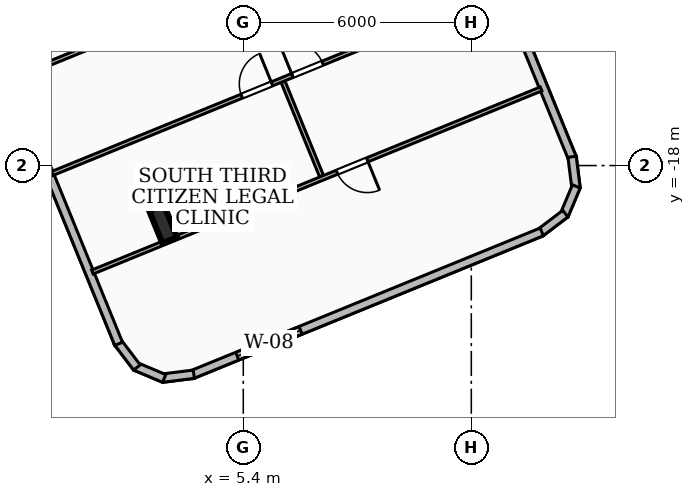
"""IFC4 building model, lengths in metres.
Left out: names, types, materials, properties, quantities, classifications, styles, units other than length and angle.
Written with IfcOpenShell. Run it as: python <this file> out.ifc"""

import sys

from ifc_helpers import new_model, si_unit, direction, frame, frame_2d, origin, origin_2d, place, context, subcontext, project, spatial, rectangle, i_section, extrude, element, fill, save


model = new_model("IFC4")
c1 = context("Model", 3, precision=1e-05, world=origin(), true_north=direction((0.0, 1.0)))
c2 = subcontext(c1, "Body", "Model", "MODEL_VIEW")
j1 = project(units=[si_unit("LENGTHUNIT", "METRE"), si_unit("PLANEANGLEUNIT", "RADIAN")], contexts=[c1])
p1 = place(None, origin())
s1 = spatial("IfcSite", under=j1, at=p1, CompositionType="ELEMENT")
p2 = place(p1, origin())
s2 = spatial("IfcBuilding", under=s1, at=p2, CompositionType="ELEMENT")
p3 = place(p2, frame((0.0, 0.0, 173.88)))
s3 = spatial("IfcBuildingStorey", under=s2, at=p3, CompositionType="ELEMENT", Elevation=173.88)
p4 = place(p3, frame((3.29, -19.536, 0.0), z_axis=(0.0, 0.0, 1.0), x_axis=(0.92587058481, 0.377840786818, 0.0)))
e1 = element("IfcColumn", 1, at=p4, inside=s3, PredefinedType="COLUMN", context=c2, shape_type="SweptSolid", body=[
    extrude(i_section(OverallWidth=0.418, OverallDepth=0.927, WebThickness=0.019, FlangeThickness=0.032, at=origin_2d()), origin(), (0.0, 0.0, 1.0), 3.6),
])
p5 = place(p3, frame((11.246, -10.912, 0.0), z_axis=(0.0, 0.0, 1.0), x_axis=(0.377850036169, -0.925866810166, 0.0)))
e2 = element("IfcWall", 2, at=p5, inside=s3, PredefinedType="SOLIDWALL", context=c2, shape_type="SweptSolid", body=[
    extrude(rectangle(XDim=7.458, YDim=0.22, at=frame_2d((3.729, 0.0))), origin(), (0.0, 0.0, 1.0), 3.34),
])
p6 = place(p3, frame((14.052, -17.769, 0.0), z_axis=(0.0, 0.0, 1.0), x_axis=(0.124646916858, -0.992201162123, 0.0)))
e3 = element("IfcWall", 3, at=p6, inside=s3, PredefinedType="SOLIDWALL", context=c2, shape_type="SweptSolid", body=[
    extrude(rectangle(XDim=0.834, YDim=0.22, at=frame_2d((0.417, 0.0))), origin(), (0.0, 0.0, 1.0), 3.34),
])
p7 = place(p3, frame((14.163, -18.549, 0.0), z_axis=(0.0, 0.0, 1.0), x_axis=(-0.388336782412, -0.92151752204, 0.0)))
e4 = element("IfcWall", 4, at=p7, inside=s3, PredefinedType="SOLIDWALL", context=c2, shape_type="SweptSolid", body=[
    extrude(rectangle(XDim=0.819, YDim=0.22, at=frame_2d((0.41, 0.0))), origin(), (0.0, 0.0, 1.0), 3.34),
])
p8 = place(p3, frame((13.875, -19.266, 0.0), z_axis=(0.0, 0.0, 1.0), x_axis=(-0.796613459657, -0.604489037034, 0.0)))
e5 = element("IfcWall", 5, at=p8, inside=s3, PredefinedType="SOLIDWALL", context=c2, shape_type="SweptSolid", body=[
    extrude(rectangle(XDim=0.833, YDim=0.22, at=frame_2d((0.417, 0.0))), origin(), (0.0, 0.0, 1.0), 3.34),
])
p9 = place(p3, frame((13.254, -19.746, 0.0), z_axis=(0.0, 0.0, 1.0), x_axis=(-0.925876400685, -0.377826535137, 0.0)))
e6 = element("IfcWall", 6, at=p9, inside=s3, PredefinedType="SOLIDWALL", context=c2, shape_type="SweptSolid", body=[
    extrude(rectangle(XDim=9.941, YDim=0.22, at=frame_2d((4.97, 0.0))), origin(), (0.0, 0.0, 1.0), 3.34),
])
p10 = place(p9, frame((6.854, 0.0, 0.85)))
e7 = element("IfcOpeningElement", 7, at=p10, cuts=e6, PredefinedType="OPENING", context=c2, shape_type="SweptSolid", body=[
    extrude(rectangle(XDim=1.8, YDim=1.8, at=frame_2d((0.9, 0.9))), frame((0.0, 0.12, 0.0), z_axis=(0.0, -1.0, 0.0), x_axis=(1.0, 0.0, 0.0)), (0.0, 0.0, 1.0), 0.24),
])
p11 = place(p3, frame((4.098, -23.49, 0.0), z_axis=(0.0, 0.0, 1.0), x_axis=(-0.992201162123, -0.124646916858, 0.0)))
e8 = element("IfcWall", 8, at=p11, inside=s3, PredefinedType="SOLIDWALL", context=c2, shape_type="SweptSolid", body=[
    extrude(rectangle(XDim=0.834, YDim=0.22, at=frame_2d((0.417, 0.0))), origin(), (0.0, 0.0, 1.0), 3.34),
])
p12 = place(p3, frame((3.318, -23.601, 0.0), z_axis=(0.0, 0.0, 1.0), x_axis=(-0.921562448508, 0.38823015532, 0.0)))
e9 = element("IfcWall", 9, at=p12, inside=s3, PredefinedType="SOLIDWALL", context=c2, shape_type="SweptSolid", body=[
    extrude(rectangle(XDim=0.819, YDim=0.22, at=frame_2d((0.41, 0.0))), origin(), (0.0, 0.0, 1.0), 3.34),
])
p13 = place(p3, frame((2.601, -23.313, 0.0), z_axis=(0.0, 0.0, 1.0), x_axis=(-0.604853461147, 0.796336794666, 0.0)))
e10 = element("IfcWall", 10, at=p13, inside=s3, PredefinedType="SOLIDWALL", context=c2, shape_type="SweptSolid", body=[
    extrude(rectangle(XDim=0.835, YDim=0.22, at=frame_2d((0.417, 0.0))), origin(), (0.0, 0.0, 1.0), 3.34),
])
p14 = place(p3, frame((2.12, -22.691, 0.0), z_axis=(0.0, 0.0, 1.0), x_axis=(-0.377754391584, 0.92590583735, 0.0)))
e11 = element("IfcWall", 11, at=p14, inside=s3, PredefinedType="SOLIDWALL", context=c2, shape_type="SweptSolid", body=[
    extrude(rectangle(XDim=7.458, YDim=0.22, at=frame_2d((3.729, 0.0))), origin(), (0.0, 0.0, 1.0), 2.644),
])
p15 = place(p3, frame((14.973, -9.323, 0.0), z_axis=(0.0, 0.0, 1.0), x_axis=(-0.92584978414, -0.377891753295, 0.0)))
e12 = element("IfcWall", 12, at=p15, inside=s3, PredefinedType="PARTITIONING", context=c2, shape_type="SweptSolid", body=[
    extrude(rectangle(XDim=20.361, YDim=0.11, at=frame_2d((10.18, 0.0))), origin(), (0.0, 0.0, 1.0), 2.644),
])
p16 = place(p15, frame((9.741, 0.0, 0.0)))
e13 = element("IfcOpeningElement", 13, at=p16, cuts=e12, PredefinedType="OPENING", context=c2, shape_type="SweptSolid", body=[
    extrude(rectangle(XDim=1.2, YDim=2.1, at=frame_2d((0.6, 1.05))), frame((0.0, 0.065, 0.0), z_axis=(0.0, -1.0, 0.0), x_axis=(1.0, 0.0, 0.0)), (0.0, 0.0, 1.0), 0.13),
])
p17 = place(p3, frame((6.446, -15.795, 0.0), z_axis=(0.0, 0.0, 1.0), x_axis=(0.377834865886, -0.925873001076, 0.0)))
e14 = element("IfcWall", 14, at=p17, inside=s3, PredefinedType="PARTITIONING", context=c2, shape_type="SweptSolid", body=[
    extrude(rectangle(XDim=2.681, YDim=0.11, at=frame_2d((1.34, 0.0))), origin(), (0.0, 0.0, 1.0), 3.34),
])
p18 = place(p3, frame((0.373, -18.209, 0.0), z_axis=(0.0, 0.0, 1.0), x_axis=(0.925887289182, 0.377799851417, 0.0)))
e15 = element("IfcWall", 15, at=p18, inside=s3, PredefinedType="PARTITIONING", context=c2, shape_type="SweptSolid", body=[
    extrude(rectangle(XDim=12.75, YDim=0.11, at=frame_2d((6.375, 0.0))), origin(), (0.0, 0.0, 1.0), 2.644),
])
p19 = place(p18, frame((5.385, 0.0, 0.0)))
e16 = element("IfcOpeningElement", 16, at=p19, cuts=e15, PredefinedType="OPENING", context=c2, shape_type="SweptSolid", body=[
    extrude(rectangle(XDim=0.86, YDim=2.04, at=frame_2d((0.43, 1.02))), frame((0.0, 0.065, 0.0), z_axis=(0.0, -1.0, 0.0), x_axis=(1.0, 0.0, 0.0)), (0.0, 0.0, 1.0), 0.13),
])
p20 = place(p18, frame((6.825, 0.0, 0.0)))
e17 = element("IfcOpeningElement", 17, at=p20, cuts=e15, PredefinedType="OPENING", context=c2, shape_type="SweptSolid", body=[
    extrude(rectangle(XDim=0.86, YDim=2.04, at=frame_2d((0.43, 1.02))), frame((0.0, 0.065, 0.0), z_axis=(0.0, -1.0, 0.0), x_axis=(1.0, 0.0, 0.0)), (0.0, 0.0, 1.0), 0.13),
])
p21 = place(p3, frame((13.236, -15.984, 0.0), z_axis=(0.0, 0.0, 1.0), x_axis=(-0.92585653016, -0.377875224856, 0.0)))
e18 = element("IfcWall", 18, at=p21, inside=s3, PredefinedType="PARTITIONING", context=c2, shape_type="SweptSolid", body=[
    extrude(rectangle(XDim=12.75, YDim=0.11, at=frame_2d((6.375, 0.0))), origin(), (0.0, 0.0, 1.0), 3.34),
])
p22 = place(p21, frame((4.94, 0.0, 0.0)))
e19 = element("IfcOpeningElement", 19, at=p22, cuts=e18, PredefinedType="OPENING", context=c2, shape_type="SweptSolid", body=[
    extrude(rectangle(XDim=0.86, YDim=2.04, at=frame_2d((0.43, 1.02))), frame((0.0, 0.065, 0.0), z_axis=(0.0, -1.0, 0.0), x_axis=(1.0, 0.0, 0.0)), (0.0, 0.0, 1.0), 0.13),
])
p23 = place(p10, origin())
e20 = element("IfcWindow", 20, at=p23, inside=s3, PartitioningType="SINGLE_PANEL", PredefinedType="WINDOW", context=c2, shape_type="SweptSolid", body=[
    extrude(rectangle(XDim=1.8, YDim=1.8, at=frame_2d((0.9, 0.9))), frame((0.0, 0.03, 0.0), z_axis=(0.0, -1.0, 0.0), x_axis=(1.0, 0.0, 0.0)), (0.0, 0.0, 1.0), 0.06),
])
fill(e7, e20)
p24 = place(p19, origin())
e21 = element("IfcDoor", 21, at=p24, inside=s3, OperationType="SINGLE_SWING_RIGHT", PredefinedType="DOOR", context=c2, shape_type="SweptSolid", body=[
    extrude(rectangle(XDim=0.86, YDim=2.04, at=frame_2d((0.43, 1.02))), frame((0.0, 0.025, 0.0), z_axis=(0.0, -1.0, 0.0), x_axis=(1.0, 0.0, 0.0)), (0.0, 0.0, 1.0), 0.05),
])
fill(e16, e21)
p25 = place(p20, origin())
e22 = element("IfcDoor", 22, at=p25, inside=s3, OperationType="SINGLE_SWING_LEFT", PredefinedType="DOOR", context=c2, shape_type="SweptSolid", body=[
    extrude(rectangle(XDim=0.86, YDim=2.04, at=frame_2d((0.43, 1.02))), frame((0.0, 0.025, 0.0), z_axis=(0.0, -1.0, 0.0), x_axis=(1.0, 0.0, 0.0)), (0.0, 0.0, 1.0), 0.05),
])
fill(e17, e22)
p26 = place(p22, origin())
e23 = element("IfcDoor", 23, at=p26, inside=s3, OperationType="SINGLE_SWING_LEFT", PredefinedType="DOOR", context=c2, shape_type="SweptSolid", body=[
    extrude(rectangle(XDim=0.86, YDim=2.04, at=frame_2d((0.43, 1.02))), frame((0.0, 0.025, 0.0), z_axis=(0.0, -1.0, 0.0), x_axis=(1.0, 0.0, 0.0)), (0.0, 0.0, 1.0), 0.05),
])
fill(e19, e23)
save(model, sys.argv[1])
